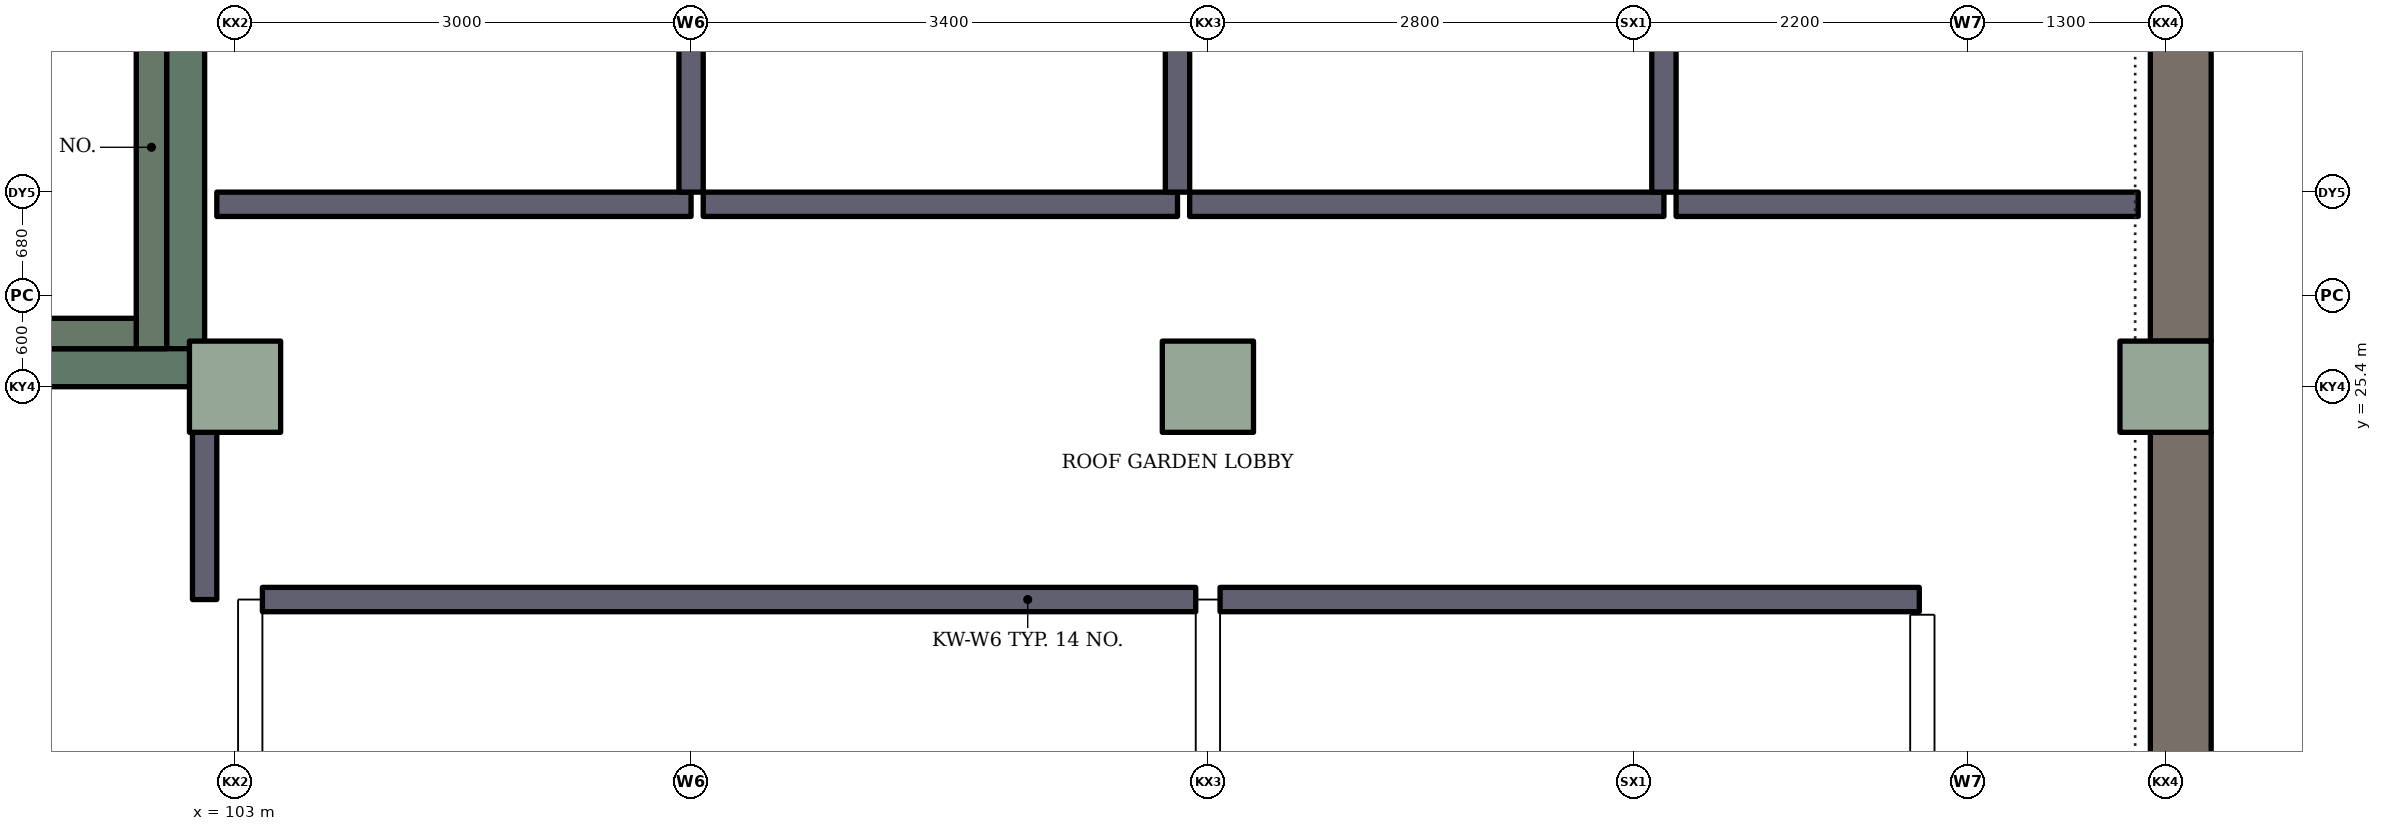
"""IFC4 building model, lengths in metres.
Left out: names, types, materials, properties, quantities, classifications, styles, units other than length and angle.
Written with IfcOpenShell. Run it as: python <this file> out.ifc"""

import sys

from ifc_helpers import new_model, si_unit, direction, frame, frame_2d, origin, origin_2d, place, context, subcontext, project, spatial, rectangle, extrude, element, fill, save


model = new_model("IFC4")
c1 = context("Model", 3, precision=1e-05, world=origin(), true_north=direction((0.0, 1.0)))
c2 = subcontext(c1, "Body", "Model", "MODEL_VIEW")
j1 = project(units=[si_unit("LENGTHUNIT", "METRE"), si_unit("PLANEANGLEUNIT", "RADIAN")], contexts=[c1])
p1 = place(None, origin())
s1 = spatial("IfcSite", under=j1, at=p1, CompositionType="ELEMENT")
p2 = place(p1, origin())
s2 = spatial("IfcBuilding", under=s1, at=p2, CompositionType="ELEMENT")
p3 = place(p2, frame((0.0, 0.0, 8.4)))
s3 = spatial("IfcBuildingStorey", under=s2, at=p3, CompositionType="ELEMENT", Elevation=8.4)
for number, where, z_axis, x_axis in (
    (1, (103.0, 25.4, 0.0), (0.0, 0.0, 1.0), (1.0, 0.0, 0.0)),
    (2, (109.4, 25.4, 0.0), (0.0, 0.0, 1.0), (1.0, 0.0, 0.0)),
    (3, (115.7, 25.4, 0.0), (0.0, 0.0, 1.0), (1.0, 0.0, 0.0)),
):
    element("IfcColumn", number, at=place(p3, frame(where, z_axis=z_axis, x_axis=x_axis)), inside=s3, PredefinedType="COLUMN", context=c2, shape_type="SweptSolid", body=[
        extrude(rectangle(XDim=0.6, YDim=0.6, at=origin_2d()), origin(), (0.0, 0.0, 1.0), 4.2),
    ])
p4 = place(p3, frame((115.8, 25.1, 0.0), z_axis=(0.0, 0.0, 1.0), x_axis=(0.0, -1.0, 0.0)))
e4 = element("IfcWall", 4, at=p4, inside=s3, PredefinedType="SOLIDWALL", context=c2, shape_type="SweptSolid", body=[
    extrude(rectangle(XDim=5.8, YDim=0.4, at=frame_2d((2.9, 0.0))), origin(), (0.0, 0.0, 1.0), 4.2),
])
p5 = place(p4, frame((1.7, 0.0, 0.9)))
e5 = element("IfcOpeningElement", 5, at=p5, cuts=e4, PredefinedType="OPENING", context=c2, shape_type="SweptSolid", body=[
    extrude(rectangle(XDim=2.4, YDim=2.7, at=frame_2d((1.2, 1.35))), frame((0.0, 0.21, 0.0), z_axis=(0.0, -1.0, 0.0), x_axis=(1.0, 0.0, 0.0)), (0.0, 0.0, 1.0), 0.42),
])
p6 = place(p3, frame((115.8, 31.4, 0.0), z_axis=(0.0, 0.0, 1.0), x_axis=(0.0, -1.0, 0.0)))
e6 = element("IfcWall", 6, at=p6, inside=s3, PredefinedType="SOLIDWALL", context=c2, shape_type="SweptSolid", body=[
    extrude(rectangle(XDim=5.7, YDim=0.4, at=frame_2d((2.85, 0.0))), origin(), (0.0, 0.0, 1.0), 4.2),
])
p7 = place(p6, frame((1.65, 0.0, 0.9)))
e7 = element("IfcOpeningElement", 7, at=p7, cuts=e6, PredefinedType="OPENING", context=c2, shape_type="SweptSolid", body=[
    extrude(rectangle(XDim=2.4, YDim=2.7, at=frame_2d((1.2, 1.35))), frame((0.0, 0.21, 0.0), z_axis=(0.0, -1.0, 0.0), x_axis=(1.0, 0.0, 0.0)), (0.0, 0.0, 1.0), 0.42),
])
p8 = place(p3, frame((102.675, 25.65, 0.0), z_axis=(0.0, 0.0, 1.0), x_axis=(0.0, 1.0, 0.0)))
e8 = element("IfcWall", 8, at=p8, inside=s3, PredefinedType="SHEAR", context=c2, shape_type="SweptSolid", body=[
    extrude(rectangle(XDim=5.95, YDim=0.25, at=frame_2d((2.975, 0.0))), origin(), (0.0, 0.0, 1.0), 4.2),
])
p9 = place(p8, frame((4.0, 0.0, 0.0)))
e9 = element("IfcOpeningElement", 9, at=p9, cuts=e8, PredefinedType="OPENING", context=c2, shape_type="SweptSolid", body=[
    extrude(rectangle(XDim=1.0, YDim=2.1, at=frame_2d((0.5, 1.05))), frame((0.0, 0.135, 0.0), z_axis=(0.0, -1.0, 0.0), x_axis=(1.0, 0.0, 0.0)), (0.0, 0.0, 1.0), 0.27),
])
p10 = place(p3, frame((96.8, 25.525, 0.0), z_axis=(0.0, 0.0, 1.0), x_axis=(1.0, 0.0, 0.0)))
e10 = element("IfcWall", 10, at=p10, inside=s3, PredefinedType="SHEAR", context=c2, shape_type="SweptSolid", body=[
    extrude(rectangle(XDim=6.0, YDim=0.25, at=frame_2d((3.0, 0.0))), origin(), (0.0, 0.0, 1.0), 4.2),
])
p11 = place(p3, frame((102.45, 25.65, 0.0), z_axis=(0.0, 0.0, 1.0), x_axis=(0.0, 1.0, 0.0)))
e11 = element("IfcWall", 11, at=p11, inside=s3, PredefinedType="SHEAR", context=c2, shape_type="SweptSolid", body=[
    extrude(rectangle(XDim=2.65, YDim=0.2, at=frame_2d((1.325, 0.0))), origin(), (0.0, 0.0, 1.0), 4.2),
])
p12 = place(p3, frame((100.55, 25.75, 0.0), z_axis=(0.0, 0.0, 1.0), x_axis=(1.0, 0.0, 0.0)))
e12 = element("IfcWall", 12, at=p12, inside=s3, PredefinedType="SHEAR", context=c2, shape_type="SweptSolid", body=[
    extrude(rectangle(XDim=1.8, YDim=0.2, at=frame_2d((0.9, 0.0))), origin(), (0.0, 0.0, 1.0), 4.2),
])
p13 = place(p3, frame((102.8, 24.0, 0.0), z_axis=(0.0, 0.0, 1.0), x_axis=(0.0, 1.0, 0.0)))
e13 = element("IfcWall", 13, at=p13, inside=s3, PredefinedType="PARTITIONING", context=c2, shape_type="SweptSolid", body=[
    extrude(rectangle(XDim=1.32, YDim=0.16, at=frame_2d((0.66, 0.0))), origin(), (0.0, 0.0, 1.0), 3.9),
])
p14 = place(p3, frame((103.1, 14.88, 0.0), z_axis=(0.0, 0.0, 1.0), x_axis=(0.0, 1.0, 0.0)))
e14 = element("IfcWall", 14, at=p14, inside=s3, PredefinedType="PARTITIONING", context=c2, shape_type="SweptSolid", body=[
    extrude(rectangle(XDim=9.12, YDim=0.16, at=frame_2d((4.56, 0.0))), origin(), (0.0, 0.0, 1.0), 3.9),
])
p15 = place(p3, frame((106.0, 26.6, 0.0), z_axis=(0.0, 0.0, 1.0), x_axis=(-1.0, 0.0, 0.0)))
e15 = element("IfcWall", 15, at=p15, inside=s3, PredefinedType="PARTITIONING", context=c2, shape_type="SweptSolid", body=[
    extrude(rectangle(XDim=3.12, YDim=0.16, at=frame_2d((1.56, 0.0))), origin(), (0.0, 0.0, 1.0), 3.9),
])
p16 = place(p15, frame((1.05, 0.0, 0.0)))
e16 = element("IfcOpeningElement", 16, at=p16, cuts=e15, PredefinedType="OPENING", context=c2, shape_type="SweptSolid", body=[
    extrude(rectangle(XDim=1.0, YDim=2.1, at=frame_2d((0.5, 1.05))), frame((0.0, 0.09, 0.0), z_axis=(0.0, -1.0, 0.0), x_axis=(1.0, 0.0, 0.0)), (0.0, 0.0, 1.0), 0.18),
])
p17 = place(p3, frame((106.0, 26.68, 0.0), z_axis=(0.0, 0.0, 1.0), x_axis=(0.0, 1.0, 0.0)))
e17 = element("IfcWall", 17, at=p17, inside=s3, PredefinedType="PARTITIONING", context=c2, shape_type="SweptSolid", body=[
    extrude(rectangle(XDim=4.84, YDim=0.16, at=frame_2d((2.42, 0.0))), origin(), (0.0, 0.0, 1.0), 3.9),
])
p18 = place(p3, frame((109.2, 26.6, 0.0), z_axis=(0.0, 0.0, 1.0), x_axis=(-1.0, 0.0, 0.0)))
e18 = element("IfcWall", 18, at=p18, inside=s3, PredefinedType="PARTITIONING", context=c2, shape_type="SweptSolid", body=[
    extrude(rectangle(XDim=3.12, YDim=0.16, at=frame_2d((1.56, 0.0))), origin(), (0.0, 0.0, 1.0), 3.9),
])
p19 = place(p18, frame((1.05, 0.0, 0.0)))
e19 = element("IfcOpeningElement", 19, at=p19, cuts=e18, PredefinedType="OPENING", context=c2, shape_type="SweptSolid", body=[
    extrude(rectangle(XDim=1.0, YDim=2.1, at=frame_2d((0.5, 1.05))), frame((0.0, 0.09, 0.0), z_axis=(0.0, -1.0, 0.0), x_axis=(1.0, 0.0, 0.0)), (0.0, 0.0, 1.0), 0.18),
])
p20 = place(p3, frame((109.2, 26.68, 0.0), z_axis=(0.0, 0.0, 1.0), x_axis=(0.0, 1.0, 0.0)))
e20 = element("IfcWall", 20, at=p20, inside=s3, PredefinedType="PARTITIONING", context=c2, shape_type="SweptSolid", body=[
    extrude(rectangle(XDim=4.92, YDim=0.16, at=frame_2d((2.46, 0.0))), origin(), (0.0, 0.0, 1.0), 3.9),
])
p21 = place(p3, frame((109.32, 24.0, 0.0), z_axis=(0.0, 0.0, 1.0), x_axis=(-1.0, 0.0, 0.0)))
e21 = element("IfcWall", 21, at=p21, inside=s3, PredefinedType="PARTITIONING", context=c2, shape_type="SweptSolid", body=[
    extrude(rectangle(XDim=6.14, YDim=0.16, at=frame_2d((3.07, 0.0))), origin(), (0.0, 0.0, 1.0), 3.9),
])
p22 = place(p21, frame((2.57, 0.0, 0.0)))
e22 = element("IfcOpeningElement", 22, at=p22, cuts=e21, PredefinedType="OPENING", context=c2, shape_type="SweptSolid", body=[
    extrude(rectangle(XDim=1.0, YDim=2.1, at=frame_2d((0.5, 1.05))), frame((0.0, 0.09, 0.0), z_axis=(0.0, -1.0, 0.0), x_axis=(1.0, 0.0, 0.0)), (0.0, 0.0, 1.0), 0.18),
])
p23 = place(p3, frame((109.4, 14.88, 0.0), z_axis=(0.0, 0.0, 1.0), x_axis=(0.0, 1.0, 0.0)))
e23 = element("IfcWall", 23, at=p23, inside=s3, PredefinedType="PARTITIONING", context=c2, shape_type="SweptSolid", body=[
    extrude(rectangle(XDim=9.12, YDim=0.16, at=frame_2d((4.56, 0.0))), origin(), (0.0, 0.0, 1.0), 3.9),
])
p24 = place(p3, frame((112.4, 26.6, 0.0), z_axis=(0.0, 0.0, 1.0), x_axis=(-1.0, 0.0, 0.0)))
e24 = element("IfcWall", 24, at=p24, inside=s3, PredefinedType="PARTITIONING", context=c2, shape_type="SweptSolid", body=[
    extrude(rectangle(XDim=3.12, YDim=0.16, at=frame_2d((1.56, 0.0))), origin(), (0.0, 0.0, 1.0), 3.9),
])
p25 = place(p24, frame((1.05, 0.0, 0.0)))
e25 = element("IfcOpeningElement", 25, at=p25, cuts=e24, PredefinedType="OPENING", context=c2, shape_type="SweptSolid", body=[
    extrude(rectangle(XDim=1.0, YDim=2.1, at=frame_2d((0.5, 1.05))), frame((0.0, 0.09, 0.0), z_axis=(0.0, -1.0, 0.0), x_axis=(1.0, 0.0, 0.0)), (0.0, 0.0, 1.0), 0.18),
])
p26 = place(p3, frame((112.4, 26.68, 0.0), z_axis=(0.0, 0.0, 1.0), x_axis=(0.0, 1.0, 0.0)))
e26 = element("IfcWall", 26, at=p26, inside=s3, PredefinedType="PARTITIONING", context=c2, shape_type="SweptSolid", body=[
    extrude(rectangle(XDim=4.84, YDim=0.16, at=frame_2d((2.42, 0.0))), origin(), (0.0, 0.0, 1.0), 3.9),
])
p27 = place(p3, frame((114.08, 24.0, 0.0), z_axis=(0.0, 0.0, 1.0), x_axis=(-1.0, 0.0, 0.0)))
e27 = element("IfcWall", 27, at=p27, inside=s3, PredefinedType="PARTITIONING", context=c2, shape_type="SweptSolid", body=[
    extrude(rectangle(XDim=4.6, YDim=0.16, at=frame_2d((2.3, 0.0))), origin(), (0.0, 0.0, 1.0), 3.9),
])
p28 = place(p27, frame((1.83, 0.0, 0.0)))
e28 = element("IfcOpeningElement", 28, at=p28, cuts=e27, PredefinedType="OPENING", context=c2, shape_type="SweptSolid", body=[
    extrude(rectangle(XDim=1.0, YDim=2.1, at=frame_2d((0.5, 1.05))), frame((0.0, 0.09, 0.0), z_axis=(0.0, -1.0, 0.0), x_axis=(1.0, 0.0, 0.0)), (0.0, 0.0, 1.0), 0.18),
])
p29 = place(p3, frame((114.1, 23.9, 0.0), z_axis=(0.0, 0.0, 1.0), x_axis=(0.0, -1.0, 0.0)))
e29 = element("IfcWall", 29, at=p29, inside=s3, PredefinedType="PARTITIONING", context=c2, shape_type="SweptSolid", body=[
    extrude(rectangle(XDim=9.02, YDim=0.16, at=frame_2d((4.51, 0.0))), origin(), (0.0, 0.0, 1.0), 3.9),
])
p30 = place(p29, frame((4.05, 0.0, 0.0)))
e30 = element("IfcOpeningElement", 30, at=p30, cuts=e29, PredefinedType="OPENING", context=c2, shape_type="SweptSolid", body=[
    extrude(rectangle(XDim=1.0, YDim=2.1, at=frame_2d((0.5, 1.05))), frame((0.0, 0.09, 0.0), z_axis=(0.0, -1.0, 0.0), x_axis=(1.0, 0.0, 0.0)), (0.0, 0.0, 1.0), 0.18),
])
p31 = place(p3, frame((115.52, 26.6, 0.0), z_axis=(0.0, 0.0, 1.0), x_axis=(-1.0, 0.0, 0.0)))
e31 = element("IfcWall", 31, at=p31, inside=s3, PredefinedType="PARTITIONING", context=c2, shape_type="SweptSolid", body=[
    extrude(rectangle(XDim=3.04, YDim=0.16, at=frame_2d((1.52, 0.0))), origin(), (0.0, 0.0, 1.0), 3.9),
])
p32 = place(p31, frame((1.07, 0.0, 0.0)))
e32 = element("IfcOpeningElement", 32, at=p32, cuts=e31, PredefinedType="OPENING", context=c2, shape_type="SweptSolid", body=[
    extrude(rectangle(XDim=1.0, YDim=2.1, at=frame_2d((0.5, 1.05))), frame((0.0, 0.09, 0.0), z_axis=(0.0, -1.0, 0.0), x_axis=(1.0, 0.0, 0.0)), (0.0, 0.0, 1.0), 0.18),
])
p33 = place(p3, frame((115.6, 25.18, 0.0), z_axis=(0.0, 0.0, 1.0), x_axis=(0.0, 1.0, 0.0)))
e33 = element("IfcWall", 33, at=p33, inside=s3, PredefinedType="PARTITIONING", context=c2, shape_type="SweptSolid", body=[
    extrude(rectangle(XDim=0.44, YDim=0.16, at=frame_2d((0.22, 0.0))), origin(), (0.0, 0.0, 1.0), 3.9),
])
p34 = place(p5, origin())
e34 = element("IfcWindow", 34, at=p34, inside=s3, PartitioningType="SINGLE_PANEL", PredefinedType="WINDOW", context=c2, shape_type="SweptSolid", body=[
    extrude(rectangle(XDim=2.4, YDim=2.7, at=frame_2d((1.2, 1.35))), frame((0.0, 0.03, 0.0), z_axis=(0.0, -1.0, 0.0), x_axis=(1.0, 0.0, 0.0)), (0.0, 0.0, 1.0), 0.06),
])
fill(e5, e34)
p35 = place(p7, origin())
e35 = element("IfcWindow", 35, at=p35, inside=s3, PartitioningType="SINGLE_PANEL", PredefinedType="WINDOW", context=c2, shape_type="SweptSolid", body=[
    extrude(rectangle(XDim=2.4, YDim=2.7, at=frame_2d((1.2, 1.35))), frame((0.0, 0.03, 0.0), z_axis=(0.0, -1.0, 0.0), x_axis=(1.0, 0.0, 0.0)), (0.0, 0.0, 1.0), 0.06),
])
fill(e7, e35)
p36 = place(p22, origin())
e36 = element("IfcDoor", 36, at=p36, inside=s3, OperationType="SINGLE_SWING_LEFT", PredefinedType="DOOR", context=c2, shape_type="SweptSolid", body=[
    extrude(rectangle(XDim=1.0, YDim=2.1, at=frame_2d((0.5, 1.05))), frame((0.0, 0.025, 0.0), z_axis=(0.0, -1.0, 0.0), x_axis=(1.0, 0.0, 0.0)), (0.0, 0.0, 1.0), 0.05),
])
fill(e22, e36)
p37 = place(p28, origin())
e37 = element("IfcDoor", 37, at=p37, inside=s3, OperationType="SINGLE_SWING_LEFT", PredefinedType="DOOR", context=c2, shape_type="SweptSolid", body=[
    extrude(rectangle(XDim=1.0, YDim=2.1, at=frame_2d((0.5, 1.05))), frame((0.0, 0.025, 0.0), z_axis=(0.0, -1.0, 0.0), x_axis=(1.0, 0.0, 0.0)), (0.0, 0.0, 1.0), 0.05),
])
fill(e28, e37)
p38 = place(p16, origin())
e38 = element("IfcDoor", 38, at=p38, inside=s3, OperationType="SINGLE_SWING_LEFT", PredefinedType="DOOR", context=c2, shape_type="SweptSolid", body=[
    extrude(rectangle(XDim=1.0, YDim=2.1, at=frame_2d((0.5, 1.05))), frame((0.0, 0.025, 0.0), z_axis=(0.0, -1.0, 0.0), x_axis=(1.0, 0.0, 0.0)), (0.0, 0.0, 1.0), 0.05),
])
fill(e16, e38)
p39 = place(p19, origin())
e39 = element("IfcDoor", 39, at=p39, inside=s3, OperationType="SINGLE_SWING_LEFT", PredefinedType="DOOR", context=c2, shape_type="SweptSolid", body=[
    extrude(rectangle(XDim=1.0, YDim=2.1, at=frame_2d((0.5, 1.05))), frame((0.0, 0.025, 0.0), z_axis=(0.0, -1.0, 0.0), x_axis=(1.0, 0.0, 0.0)), (0.0, 0.0, 1.0), 0.05),
])
fill(e19, e39)
p40 = place(p25, origin())
e40 = element("IfcDoor", 40, at=p40, inside=s3, OperationType="SINGLE_SWING_LEFT", PredefinedType="DOOR", context=c2, shape_type="SweptSolid", body=[
    extrude(rectangle(XDim=1.0, YDim=2.1, at=frame_2d((0.5, 1.05))), frame((0.0, 0.025, 0.0), z_axis=(0.0, -1.0, 0.0), x_axis=(1.0, 0.0, 0.0)), (0.0, 0.0, 1.0), 0.05),
])
fill(e25, e40)
p41 = place(p32, origin())
e41 = element("IfcDoor", 41, at=p41, inside=s3, OperationType="SINGLE_SWING_LEFT", PredefinedType="DOOR", context=c2, shape_type="SweptSolid", body=[
    extrude(rectangle(XDim=1.0, YDim=2.1, at=frame_2d((0.5, 1.05))), frame((0.0, 0.025, 0.0), z_axis=(0.0, -1.0, 0.0), x_axis=(1.0, 0.0, 0.0)), (0.0, 0.0, 1.0), 0.05),
])
fill(e32, e41)
save(model, sys.argv[1])
